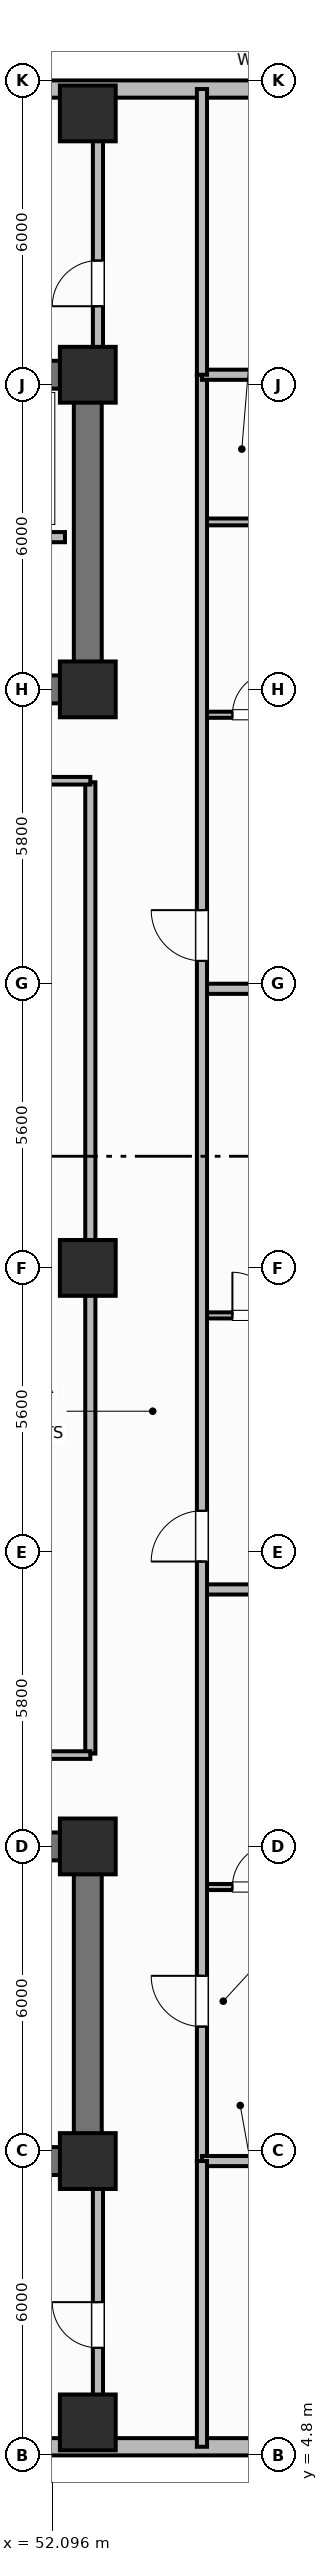
"""IFC4 building model, lengths in metres.
Left out: names, types, materials, properties, quantities, classifications, styles, units other than length and angle.
Written with IfcOpenShell. Run it as: python <this file> out.ifc"""

import sys

from ifc_helpers import new_model, si_unit, direction, frame, frame_2d, origin, origin_2d, place, context, subcontext, project, spatial, rectangle, extrude, element, fill, save


model = new_model("IFC4")
c1 = context("Model", 3, precision=1e-05, world=origin(), true_north=direction((0.0, 1.0)))
c2 = subcontext(c1, "Body", "Model", "MODEL_VIEW")
j1 = project(units=[si_unit("LENGTHUNIT", "METRE"), si_unit("PLANEANGLEUNIT", "RADIAN")], contexts=[c1])
p1 = place(None, origin())
s1 = spatial("IfcSite", under=j1, at=p1, CompositionType="ELEMENT")
p2 = place(p1, origin())
s2 = spatial("IfcBuilding", under=s1, at=p2, CompositionType="ELEMENT")
p3 = place(p2, frame((0.0, 0.0, 88.3)))
s3 = spatial("IfcBuildingStorey", under=s2, at=p3, CompositionType="ELEMENT", Elevation=88.3)
p4 = place(p3, frame((52.8, 10.6, 0.0), z_axis=(0.0, 0.0, 1.0), x_axis=(-1.0, 0.0, 0.0)))
e1 = element("IfcWall", 1, at=p4, inside=s3, PredefinedType="SHEAR", context=c2, shape_type="SweptSolid", body=[
    extrude(rectangle(XDim=27.2, YDim=0.55, at=frame_2d((13.6, 0.0))), origin(), (0.0, 0.0, 1.0), 3.7),
])
p5 = place(p3, frame((52.8, 10.875, 0.0), z_axis=(0.0, 0.0, 1.0), x_axis=(0.0, 1.0, 0.0)))
e2 = element("IfcWall", 2, at=p5, inside=s3, PredefinedType="SHEAR", context=c2, shape_type="SweptSolid", body=[
    extrude(rectangle(XDim=5.65, YDim=0.55, at=frame_2d((2.825, 0.0))), origin(), (0.0, 0.0, 1.0), 3.7),
])
p6 = place(p3, frame((25.6, 16.8, 0.0), z_axis=(0.0, 0.0, 1.0), x_axis=(1.0, 0.0, 0.0)))
e3 = element("IfcWall", 3, at=p6, inside=s3, PredefinedType="SHEAR", context=c2, shape_type="SweptSolid", body=[
    extrude(rectangle(XDim=27.2, YDim=0.55, at=frame_2d((13.6, 0.0))), origin(), (0.0, 0.0, 1.0), 3.7),
])
p7 = place(p6, frame((1.9, 0.0, 0.0)))
e4 = element("IfcOpeningElement", 4, at=p7, cuts=e3, PredefinedType="OPENING", context=c2, shape_type="SweptSolid", body=[
    extrude(rectangle(XDim=1.1, YDim=2.15, at=frame_2d((0.55, 1.075))), frame((0.0, 0.285, 0.0), z_axis=(0.0, -1.0, 0.0), x_axis=(1.0, 0.0, 0.0)), (0.0, 0.0, 1.0), 0.57),
])
p8 = place(p6, frame((13.0, 0.0, 0.0)))
e5 = element("IfcOpeningElement", 5, at=p8, cuts=e3, PredefinedType="OPENING", context=c2, shape_type="SweptSolid", body=[
    extrude(rectangle(XDim=1.2, YDim=2.15, at=frame_2d((0.6, 1.075))), frame((0.0, 0.285, 0.0), z_axis=(0.0, -1.0, 0.0), x_axis=(1.0, 0.0, 0.0)), (0.0, 0.0, 1.0), 0.57),
])
p9 = place(p6, frame((20.4, 0.0, 0.0)))
e6 = element("IfcOpeningElement", 6, at=p9, cuts=e3, PredefinedType="OPENING", context=c2, shape_type="SweptSolid", body=[
    extrude(rectangle(XDim=1.3, YDim=2.2, at=frame_2d((0.65, 1.1))), frame((0.0, 0.285, 0.0), z_axis=(0.0, -1.0, 0.0), x_axis=(1.0, 0.0, 0.0)), (0.0, 0.0, 1.0), 0.57),
])
p10 = place(p6, frame((24.65, 0.0, 0.0)))
e7 = element("IfcOpeningElement", 7, at=p10, cuts=e3, PredefinedType="OPENING", context=c2, shape_type="SweptSolid", body=[
    extrude(rectangle(XDim=0.85, YDim=2.1, at=frame_2d((0.425, 1.05))), frame((0.0, 0.285, 0.0), z_axis=(0.0, -1.0, 0.0), x_axis=(1.0, 0.0, 0.0)), (0.0, 0.0, 1.0), 0.57),
])
p11 = place(p3, frame((25.6, 45.8, 0.0), z_axis=(0.0, 0.0, 1.0), x_axis=(1.0, 0.0, 0.0)))
e8 = element("IfcWall", 8, at=p11, inside=s3, PredefinedType="SHEAR", context=c2, shape_type="SweptSolid", body=[
    extrude(rectangle(XDim=27.2, YDim=0.55, at=frame_2d((13.6, 0.0))), origin(), (0.0, 0.0, 1.0), 3.7),
])
p12 = place(p3, frame((52.8, 39.875, 0.0), z_axis=(0.0, 0.0, 1.0), x_axis=(0.0, 1.0, 0.0)))
e9 = element("IfcWall", 9, at=p12, inside=s3, PredefinedType="SHEAR", context=c2, shape_type="SweptSolid", body=[
    extrude(rectangle(XDim=5.65, YDim=0.55, at=frame_2d((2.825, 0.0))), origin(), (0.0, 0.0, 1.0), 3.7),
])
p13 = place(p3, frame((52.8, 39.6, 0.0), z_axis=(0.0, 0.0, 1.0), x_axis=(-1.0, 0.0, 0.0)))
e10 = element("IfcWall", 10, at=p13, inside=s3, PredefinedType="SHEAR", context=c2, shape_type="SweptSolid", body=[
    extrude(rectangle(XDim=27.2, YDim=0.55, at=frame_2d((13.6, 0.0))), origin(), (0.0, 0.0, 1.0), 3.7),
])
p14 = place(p13, frame((24.2, 0.0, 0.0)))
e11 = element("IfcOpeningElement", 11, at=p14, cuts=e10, PredefinedType="OPENING", context=c2, shape_type="SweptSolid", body=[
    extrude(rectangle(XDim=1.1, YDim=2.15, at=frame_2d((0.55, 1.075))), frame((0.0, 0.285, 0.0), z_axis=(0.0, -1.0, 0.0), x_axis=(1.0, 0.0, 0.0)), (0.0, 0.0, 1.0), 0.57),
])
p15 = place(p13, frame((15.1, 0.0, 0.0)))
e12 = element("IfcOpeningElement", 12, at=p15, cuts=e10, PredefinedType="OPENING", context=c2, shape_type="SweptSolid", body=[
    extrude(rectangle(XDim=1.2, YDim=2.15, at=frame_2d((0.6, 1.075))), frame((0.0, 0.285, 0.0), z_axis=(0.0, -1.0, 0.0), x_axis=(1.0, 0.0, 0.0)), (0.0, 0.0, 1.0), 0.57),
])
p16 = place(p13, frame((11.3, 0.0, 0.0)))
e13 = element("IfcOpeningElement", 13, at=p16, cuts=e10, PredefinedType="OPENING", context=c2, shape_type="SweptSolid", body=[
    extrude(rectangle(XDim=1.3, YDim=2.2, at=frame_2d((0.65, 1.1))), frame((0.0, 0.285, 0.0), z_axis=(0.0, -1.0, 0.0), x_axis=(1.0, 0.0, 0.0)), (0.0, 0.0, 1.0), 0.57),
])
p17 = place(p13, frame((7.25, 0.0, 0.0)))
e14 = element("IfcOpeningElement", 14, at=p17, cuts=e10, PredefinedType="OPENING", context=c2, shape_type="SweptSolid", body=[
    extrude(rectangle(XDim=0.85, YDim=2.1, at=frame_2d((0.425, 1.05))), frame((0.0, 0.285, 0.0), z_axis=(0.0, -1.0, 0.0), x_axis=(1.0, 0.0, 0.0)), (0.0, 0.0, 1.0), 0.57),
])
p18 = place(p13, frame((3.0, 0.0, 0.0)))
e15 = element("IfcOpeningElement", 15, at=p18, cuts=e10, PredefinedType="OPENING", context=c2, shape_type="SweptSolid", body=[
    extrude(rectangle(XDim=0.9, YDim=2.1, at=frame_2d((0.45, 1.05))), frame((0.0, 0.285, 0.0), z_axis=(0.0, -1.0, 0.0), x_axis=(1.0, 0.0, 0.0)), (0.0, 0.0, 1.0), 0.57),
])
for number, where, z_axis, x_axis in (
    (16, (52.8, 10.6, 0.0), (0.0, 0.0, 1.0), (1.0, 0.0, 0.0)),
    (17, (52.8, 16.8, 0.0), (0.0, 0.0, 1.0), (1.0, 0.0, 0.0)),
    (18, (52.8, 39.6, 0.0), (0.0, 0.0, 1.0), (1.0, 0.0, 0.0)),
    (19, (52.8, 45.8, 0.0), (0.0, 0.0, 1.0), (1.0, 0.0, 0.0)),
    (20, (52.8, 28.2, 0.0), (0.0, 0.0, 1.0), (1.0, 0.0, 0.0)),
    (21, (52.8, 5.45, 0.0), (0.0, 0.0, 1.0), (1.0, 0.0, 0.0)),
    (22, (52.8, 50.95, 0.0), (0.0, 0.0, 1.0), (1.0, 0.0, 0.0)),
):
    element("IfcColumn", number, at=place(p3, frame(where, z_axis=z_axis, x_axis=x_axis)), inside=s3, PredefinedType="COLUMN", context=c2, shape_type="SweptSolid", body=[
        extrude(rectangle(XDim=1.1, YDim=1.1, at=origin_2d()), origin(), (0.0, 0.0, 1.0), 3.7),
    ])
p19 = place(p3, frame((42.4, 4.97, 0.0), z_axis=(0.0, 0.0, 1.0), x_axis=(1.0, 0.0, 0.0)))
e23 = element("IfcWall", 23, at=p19, inside=s3, PredefinedType="SOLIDWALL", context=c2, shape_type="SweptSolid", body=[
    extrude(rectangle(XDim=17.4, YDim=0.34, at=frame_2d((8.7, 0.0))), origin(), (0.0, 0.0, 1.0), 2.7),
])
p20 = place(p19, frame((2.16, 0.0, 0.68)))
e24 = element("IfcOpeningElement", 24, at=p20, cuts=e23, PredefinedType="OPENING", context=c2, shape_type="SweptSolid", body=[
    extrude(rectangle(XDim=1.6, YDim=1.9, at=frame_2d((0.8, 0.95))), frame((0.0, 0.18, 0.0), z_axis=(0.0, -1.0, 0.0), x_axis=(1.0, 0.0, 0.0)), (0.0, 0.0, 1.0), 0.36),
])
p21 = place(p19, frame((5.03, 0.0, 0.68)))
e25 = element("IfcOpeningElement", 25, at=p21, cuts=e23, PredefinedType="OPENING", context=c2, shape_type="SweptSolid", body=[
    extrude(rectangle(XDim=1.6, YDim=1.9, at=frame_2d((0.8, 0.95))), frame((0.0, 0.18, 0.0), z_axis=(0.0, -1.0, 0.0), x_axis=(1.0, 0.0, 0.0)), (0.0, 0.0, 1.0), 0.36),
])
p22 = place(p19, frame((7.55, 0.0, 0.68)))
e26 = element("IfcOpeningElement", 26, at=p22, cuts=e23, PredefinedType="OPENING", context=c2, shape_type="SweptSolid", body=[
    extrude(rectangle(XDim=1.6, YDim=1.9, at=frame_2d((0.8, 0.95))), frame((0.0, 0.18, 0.0), z_axis=(0.0, -1.0, 0.0), x_axis=(1.0, 0.0, 0.0)), (0.0, 0.0, 1.0), 0.36),
])
p23 = place(p19, frame((14.34, 0.0, 0.68)))
e27 = element("IfcOpeningElement", 27, at=p23, cuts=e23, PredefinedType="OPENING", context=c2, shape_type="SweptSolid", body=[
    extrude(rectangle(XDim=1.6, YDim=1.9, at=frame_2d((0.8, 0.95))), frame((0.0, 0.18, 0.0), z_axis=(0.0, -1.0, 0.0), x_axis=(1.0, 0.0, 0.0)), (0.0, 0.0, 1.0), 0.36),
])
p24 = place(p3, frame((59.8, 51.43, 0.0), z_axis=(0.0, 0.0, 1.0), x_axis=(-1.0, 0.0, 0.0)))
e28 = element("IfcWall", 28, at=p24, inside=s3, PredefinedType="SOLIDWALL", context=c2, shape_type="SweptSolid", body=[
    extrude(rectangle(XDim=17.4, YDim=0.34, at=frame_2d((8.7, 0.0))), origin(), (0.0, 0.0, 1.0), 2.7),
])
p25 = place(p24, frame((1.613, 0.0, 0.68)))
e29 = element("IfcOpeningElement", 29, at=p25, cuts=e28, PredefinedType="OPENING", context=c2, shape_type="SweptSolid", body=[
    extrude(rectangle(XDim=2.1, YDim=1.9, at=frame_2d((1.05, 0.95))), frame((0.0, 0.18, 0.0), z_axis=(0.0, -1.0, 0.0), x_axis=(1.0, 0.0, 0.0)), (0.0, 0.0, 1.0), 0.36),
])
p26 = place(p24, frame((9.663, 0.0, 0.68)))
e30 = element("IfcOpeningElement", 30, at=p26, cuts=e28, PredefinedType="OPENING", context=c2, shape_type="SweptSolid", body=[
    extrude(rectangle(XDim=2.1, YDim=1.9, at=frame_2d((1.05, 0.95))), frame((0.0, 0.18, 0.0), z_axis=(0.0, -1.0, 0.0), x_axis=(1.0, 0.0, 0.0)), (0.0, 0.0, 1.0), 0.36),
])
p27 = place(p24, frame((12.988, 0.0, 0.68)))
e31 = element("IfcOpeningElement", 31, at=p27, cuts=e28, PredefinedType="OPENING", context=c2, shape_type="SweptSolid", body=[
    extrude(rectangle(XDim=2.1, YDim=1.9, at=frame_2d((1.05, 0.95))), frame((0.0, 0.18, 0.0), z_axis=(0.0, -1.0, 0.0), x_axis=(1.0, 0.0, 0.0)), (0.0, 0.0, 1.0), 0.36),
])
p28 = place(p3, frame((52.35, 42.6, 0.0), z_axis=(0.0, 0.0, 1.0), x_axis=(-1.0, 0.0, 0.0)))
e32 = element("IfcWall", 32, at=p28, inside=s3, PredefinedType="PARTITIONING", context=c2, shape_type="SweptSolid", body=[
    extrude(rectangle(XDim=8.8, YDim=0.2, at=frame_2d((4.4, 0.0))), origin(), (0.0, 0.0, 1.0), 2.53),
])
p29 = place(p28, frame((7.1, 0.0, 0.0)))
e33 = element("IfcOpeningElement", 33, at=p29, cuts=e32, PredefinedType="OPENING", context=c2, shape_type="SweptSolid", body=[
    extrude(rectangle(XDim=1.0, YDim=2.15, at=frame_2d((0.5, 1.075))), frame((0.0, 0.11, 0.0), z_axis=(0.0, -1.0, 0.0), x_axis=(1.0, 0.0, 0.0)), (0.0, 0.0, 1.0), 0.22),
])
p30 = place(p3, frame((52.85, 18.63, 0.0), z_axis=(0.0, 0.0, 1.0), x_axis=(0.0, 1.0, 0.0)))
e34 = element("IfcWall", 34, at=p30, inside=s3, PredefinedType="PARTITIONING", context=c2, shape_type="SweptSolid", body=[
    extrude(rectangle(XDim=19.14, YDim=0.2, at=frame_2d((9.57, 0.0))), origin(), (0.0, 0.0, 1.0), 2.53),
])
for number, where, z_axis, x_axis in (
    (35, (46.35, 18.6, 0.0), (0.0, 0.0, 1.0), (1.0, 0.0, 0.0)),
    (36, (46.35, 37.8, 0.0), (0.0, 0.0, 1.0), (1.0, 0.0, 0.0)),
):
    element("IfcWall", number, at=place(p3, frame(where, z_axis=z_axis, x_axis=x_axis)), inside=s3, PredefinedType="PARTITIONING", context=c2, shape_type="SweptSolid", body=[
        extrude(rectangle(XDim=6.5, YDim=0.15, at=frame_2d((3.25, 0.0))), origin(), (0.0, 0.0, 1.0), 2.53),
    ])
p31 = place(p3, frame((55.05, 16.0, 0.0), z_axis=(0.0, 0.0, 1.0), x_axis=(1.0, 0.0, 0.0)))
e37 = element("IfcWall", 37, at=p31, inside=s3, PredefinedType="PARTITIONING", context=c2, shape_type="SweptSolid", body=[
    extrude(rectangle(XDim=2.25, YDim=0.12, at=frame_2d((1.125, 0.0))), origin(), (0.0, 0.0, 1.0), 2.53),
])
p32 = place(p31, frame((0.6, 0.0, 0.0)))
e38 = element("IfcOpeningElement", 38, at=p32, cuts=e37, PredefinedType="OPENING", context=c2, shape_type="SweptSolid", body=[
    extrude(rectangle(XDim=0.85, YDim=2.1, at=frame_2d((0.425, 1.05))), frame((0.0, 0.07, 0.0), z_axis=(0.0, -1.0, 0.0), x_axis=(1.0, 0.0, 0.0)), (0.0, 0.0, 1.0), 0.14),
])
p33 = place(p3, frame((55.05, 21.864, 0.0), z_axis=(0.0, 0.0, 1.0), x_axis=(1.0, 0.0, 0.0)))
e39 = element("IfcWall", 39, at=p33, inside=s3, PredefinedType="PARTITIONING", context=c2, shape_type="SweptSolid", body=[
    extrude(rectangle(XDim=8.78, YDim=0.2, at=frame_2d((4.39, 0.0))), origin(), (0.0, 0.0, 1.0), 2.53),
])
p34 = place(p3, frame((55.05, 27.264, 0.0), z_axis=(0.0, 0.0, 1.0), x_axis=(1.0, 0.0, 0.0)))
e40 = element("IfcWall", 40, at=p34, inside=s3, PredefinedType="PARTITIONING", context=c2, shape_type="SweptSolid", body=[
    extrude(rectangle(XDim=2.25, YDim=0.12, at=frame_2d((1.125, 0.0))), origin(), (0.0, 0.0, 1.0), 2.53),
])
p35 = place(p34, frame((0.6, 0.0, 0.0)))
e41 = element("IfcOpeningElement", 41, at=p35, cuts=e40, PredefinedType="OPENING", context=c2, shape_type="SweptSolid", body=[
    extrude(rectangle(XDim=0.85, YDim=2.1, at=frame_2d((0.425, 1.05))), frame((0.0, 0.07, 0.0), z_axis=(0.0, -1.0, 0.0), x_axis=(1.0, 0.0, 0.0)), (0.0, 0.0, 1.0), 0.14),
])
p36 = place(p3, frame((55.05, 33.7, 0.0), z_axis=(0.0, 0.0, 1.0), x_axis=(1.0, 0.0, 0.0)))
e42 = element("IfcWall", 42, at=p36, inside=s3, PredefinedType="PARTITIONING", context=c2, shape_type="SweptSolid", body=[
    extrude(rectangle(XDim=8.78, YDim=0.2, at=frame_2d((4.39, 0.0))), origin(), (0.0, 0.0, 1.0), 2.53),
])
p37 = place(p3, frame((55.05, 39.1, 0.0), z_axis=(0.0, 0.0, 1.0), x_axis=(1.0, 0.0, 0.0)))
e43 = element("IfcWall", 43, at=p37, inside=s3, PredefinedType="PARTITIONING", context=c2, shape_type="SweptSolid", body=[
    extrude(rectangle(XDim=2.25, YDim=0.12, at=frame_2d((1.125, 0.0))), origin(), (0.0, 0.0, 1.0), 2.53),
])
p38 = place(p37, frame((0.6, 0.0, 0.0)))
e44 = element("IfcOpeningElement", 44, at=p38, cuts=e43, PredefinedType="OPENING", context=c2, shape_type="SweptSolid", body=[
    extrude(rectangle(XDim=0.85, YDim=2.1, at=frame_2d((0.425, 1.05))), frame((0.0, 0.07, 0.0), z_axis=(0.0, -1.0, 0.0), x_axis=(1.0, 0.0, 0.0)), (0.0, 0.0, 1.0), 0.14),
])
p39 = place(p3, frame((55.05, 42.9, 0.0), z_axis=(0.0, 0.0, 1.0), x_axis=(1.0, 0.0, 0.0)))
e45 = element("IfcWall", 45, at=p39, inside=s3, PredefinedType="PARTITIONING", context=c2, shape_type="SweptSolid", body=[
    extrude(rectangle(XDim=2.25, YDim=0.135, at=frame_2d((1.125, 0.0))), origin(), (0.0, 0.0, 1.0), 2.53),
])
p40 = place(p3, frame((55.05, 10.6, 0.0), z_axis=(0.0, 0.0, 1.0), x_axis=(0.0, 1.0, 0.0)))
e46 = element("IfcWall", 46, at=p40, inside=s3, PredefinedType="PARTITIONING", context=c2, shape_type="SweptSolid", body=[
    extrude(rectangle(XDim=35.2, YDim=0.2, at=frame_2d((17.6, 0.0))), origin(), (0.0, 0.0, 1.0), 2.53),
])
p41 = place(p40, frame((2.65, 0.0, 0.0)))
e47 = element("IfcOpeningElement", 47, at=p41, cuts=e46, PredefinedType="OPENING", context=c2, shape_type="SweptSolid", body=[
    extrude(rectangle(XDim=1.0, YDim=2.15, at=frame_2d((0.5, 1.075))), frame((0.0, 0.11, 0.0), z_axis=(0.0, -1.0, 0.0), x_axis=(1.0, 0.0, 0.0)), (0.0, 0.0, 1.0), 0.22),
])
p42 = place(p40, frame((11.814, 0.0, 0.0)))
e48 = element("IfcOpeningElement", 48, at=p42, cuts=e46, PredefinedType="OPENING", context=c2, shape_type="SweptSolid", body=[
    extrude(rectangle(XDim=1.0, YDim=2.15, at=frame_2d((0.5, 1.075))), frame((0.0, 0.11, 0.0), z_axis=(0.0, -1.0, 0.0), x_axis=(1.0, 0.0, 0.0)), (0.0, 0.0, 1.0), 0.22),
])
p43 = place(p40, frame((23.65, 0.0, 0.0)))
e49 = element("IfcOpeningElement", 49, at=p43, cuts=e46, PredefinedType="OPENING", context=c2, shape_type="SweptSolid", body=[
    extrude(rectangle(XDim=1.0, YDim=2.15, at=frame_2d((0.5, 1.075))), frame((0.0, 0.11, 0.0), z_axis=(0.0, -1.0, 0.0), x_axis=(1.0, 0.0, 0.0)), (0.0, 0.0, 1.0), 0.22),
])
for number, where, z_axis, x_axis in (
    (50, (55.05, 10.6, 0.0), (0.0, 0.0, 1.0), (1.0, 0.0, 0.0)),
    (51, (55.05, 45.8, 0.0), (0.0, 0.0, 1.0), (1.0, 0.0, 0.0)),
):
    element("IfcWall", number, at=place(p3, frame(where, z_axis=z_axis, x_axis=x_axis)), inside=s3, PredefinedType="PARTITIONING", context=c2, shape_type="SweptSolid", body=[
        extrude(rectangle(XDim=8.36, YDim=0.2, at=frame_2d((4.18, 0.0))), origin(), (0.0, 0.0, 1.0), 2.53),
    ])
p44 = place(p3, frame((55.05, 4.97, 0.0), z_axis=(0.0, 0.0, 1.0), x_axis=(0.0, 1.0, 0.0)))
e52 = element("IfcWall", 52, at=p44, inside=s3, PredefinedType="PARTITIONING", context=c2, shape_type="SweptSolid", body=[
    extrude(rectangle(XDim=5.63, YDim=0.2, at=frame_2d((2.815, 0.0))), origin(), (0.0, 0.0, 1.0), 2.53),
])
p45 = place(p3, frame((55.05, 45.8, 0.0), z_axis=(0.0, 0.0, 1.0), x_axis=(0.0, 1.0, 0.0)))
e53 = element("IfcWall", 53, at=p45, inside=s3, PredefinedType="PARTITIONING", context=c2, shape_type="SweptSolid", body=[
    extrude(rectangle(XDim=5.63, YDim=0.2, at=frame_2d((2.815, 0.0))), origin(), (0.0, 0.0, 1.0), 2.53),
])
p46 = place(p3, frame((53.0, 5.62, 0.0), z_axis=(0.0, 0.0, 1.0), x_axis=(0.0, 1.0, 0.0)))
e54 = element("IfcWall", 54, at=p46, inside=s3, PredefinedType="PARTITIONING", context=c2, shape_type="SweptSolid", body=[
    extrude(rectangle(XDim=4.68, YDim=0.2, at=frame_2d((2.34, 0.0))), origin(), (0.0, 0.0, 1.0), 2.53),
])
p47 = place(p46, frame((1.3, 0.0, 0.0)))
e55 = element("IfcOpeningElement", 55, at=p47, cuts=e54, PredefinedType="OPENING", context=c2, shape_type="SweptSolid", body=[
    extrude(rectangle(XDim=0.9, YDim=2.1, at=frame_2d((0.45, 1.05))), frame((0.0, 0.11, 0.0), z_axis=(0.0, -1.0, 0.0), x_axis=(1.0, 0.0, 0.0)), (0.0, 0.0, 1.0), 0.22),
])
p48 = place(p3, frame((53.0, 46.1, 0.0), z_axis=(0.0, 0.0, 1.0), x_axis=(0.0, 1.0, 0.0)))
e56 = element("IfcWall", 56, at=p48, inside=s3, PredefinedType="PARTITIONING", context=c2, shape_type="SweptSolid", body=[
    extrude(rectangle(XDim=4.68, YDim=0.2, at=frame_2d((2.34, 0.0))), origin(), (0.0, 0.0, 1.0), 2.53),
])
p49 = place(p48, frame((1.05, 0.0, 0.0)))
e57 = element("IfcOpeningElement", 57, at=p49, cuts=e56, PredefinedType="OPENING", context=c2, shape_type="SweptSolid", body=[
    extrude(rectangle(XDim=0.9, YDim=2.1, at=frame_2d((0.45, 1.05))), frame((0.0, 0.11, 0.0), z_axis=(0.0, -1.0, 0.0), x_axis=(1.0, 0.0, 0.0)), (0.0, 0.0, 1.0), 0.22),
])
p50 = place(p32, origin())
e58 = element("IfcDoor", 58, at=p50, inside=s3, OperationType="SINGLE_SWING_RIGHT", PredefinedType="DOOR", context=c2, shape_type="SweptSolid", body=[
    extrude(rectangle(XDim=0.85, YDim=2.1, at=frame_2d((0.425, 1.05))), frame((0.0, 0.025, 0.0), z_axis=(0.0, -1.0, 0.0), x_axis=(1.0, 0.0, 0.0)), (0.0, 0.0, 1.0), 0.05),
])
fill(e38, e58)
p51 = place(p35, origin())
e59 = element("IfcDoor", 59, at=p51, inside=s3, OperationType="SINGLE_SWING_LEFT", PredefinedType="DOOR", context=c2, shape_type="SweptSolid", body=[
    extrude(rectangle(XDim=0.85, YDim=2.1, at=frame_2d((0.425, 1.05))), frame((0.0, 0.025, 0.0), z_axis=(0.0, -1.0, 0.0), x_axis=(1.0, 0.0, 0.0)), (0.0, 0.0, 1.0), 0.05),
])
fill(e41, e59)
p52 = place(p38, origin())
e60 = element("IfcDoor", 60, at=p52, inside=s3, OperationType="SINGLE_SWING_RIGHT", PredefinedType="DOOR", context=c2, shape_type="SweptSolid", body=[
    extrude(rectangle(XDim=0.85, YDim=2.1, at=frame_2d((0.425, 1.05))), frame((0.0, 0.025, 0.0), z_axis=(0.0, -1.0, 0.0), x_axis=(1.0, 0.0, 0.0)), (0.0, 0.0, 1.0), 0.05),
])
fill(e44, e60)
p53 = place(p41, origin())
e61 = element("IfcDoor", 61, at=p53, inside=s3, OperationType="SINGLE_SWING_RIGHT", PredefinedType="DOOR", context=c2, shape_type="SweptSolid", body=[
    extrude(rectangle(XDim=1.0, YDim=2.15, at=frame_2d((0.5, 1.075))), frame((0.0, 0.025, 0.0), z_axis=(0.0, -1.0, 0.0), x_axis=(1.0, 0.0, 0.0)), (0.0, 0.0, 1.0), 0.05),
])
fill(e47, e61)
p54 = place(p42, origin())
e62 = element("IfcDoor", 62, at=p54, inside=s3, OperationType="SINGLE_SWING_LEFT", PredefinedType="DOOR", context=c2, shape_type="SweptSolid", body=[
    extrude(rectangle(XDim=1.0, YDim=2.15, at=frame_2d((0.5, 1.075))), frame((0.0, 0.025, 0.0), z_axis=(0.0, -1.0, 0.0), x_axis=(1.0, 0.0, 0.0)), (0.0, 0.0, 1.0), 0.05),
])
fill(e48, e62)
p55 = place(p43, origin())
e63 = element("IfcDoor", 63, at=p55, inside=s3, OperationType="SINGLE_SWING_RIGHT", PredefinedType="DOOR", context=c2, shape_type="SweptSolid", body=[
    extrude(rectangle(XDim=1.0, YDim=2.15, at=frame_2d((0.5, 1.075))), frame((0.0, 0.025, 0.0), z_axis=(0.0, -1.0, 0.0), x_axis=(1.0, 0.0, 0.0)), (0.0, 0.0, 1.0), 0.05),
])
fill(e49, e63)
p56 = place(p47, origin())
e64 = element("IfcDoor", 64, at=p56, inside=s3, OperationType="SINGLE_SWING_RIGHT", PredefinedType="DOOR", context=c2, shape_type="SweptSolid", body=[
    extrude(rectangle(XDim=0.9, YDim=2.1, at=frame_2d((0.45, 1.05))), frame((0.0, 0.025, 0.0), z_axis=(0.0, -1.0, 0.0), x_axis=(1.0, 0.0, 0.0)), (0.0, 0.0, 1.0), 0.05),
])
fill(e55, e64)
p57 = place(p49, origin())
e65 = element("IfcDoor", 65, at=p57, inside=s3, OperationType="SINGLE_SWING_LEFT", PredefinedType="DOOR", context=c2, shape_type="SweptSolid", body=[
    extrude(rectangle(XDim=0.9, YDim=2.1, at=frame_2d((0.45, 1.05))), frame((0.0, 0.025, 0.0), z_axis=(0.0, -1.0, 0.0), x_axis=(1.0, 0.0, 0.0)), (0.0, 0.0, 1.0), 0.05),
])
fill(e57, e65)
save(model, sys.argv[1])
